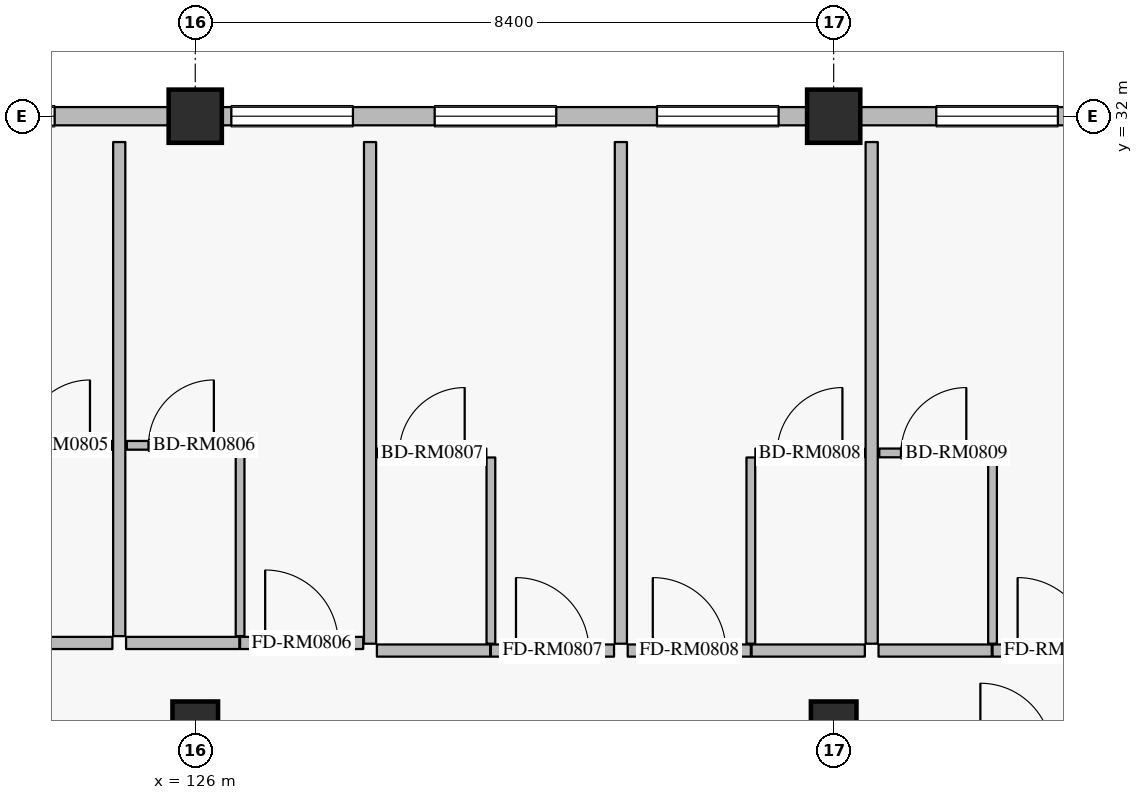
"""IFC4 building model, lengths in metres.
Left out: names, types, materials, properties, quantities, classifications, styles, units other than length and angle.
Written with IfcOpenShell. Run it as: python <this file> out.ifc"""

import sys

from ifc_helpers import new_model, si_unit, direction, frame, frame_2d, origin, origin_2d, place, context, subcontext, project, spatial, rectangle, extrude, element, fill, save


model = new_model("IFC4")
c1 = context("Model", 3, precision=1e-05, world=origin(), true_north=direction((0.0, 1.0)))
c2 = subcontext(c1, "Body", "Model", "MODEL_VIEW")
j1 = project(units=[si_unit("LENGTHUNIT", "METRE"), si_unit("PLANEANGLEUNIT", "RADIAN")], contexts=[c1])
p1 = place(None, origin())
s1 = spatial("IfcSite", under=j1, at=p1, CompositionType="ELEMENT")
p2 = place(p1, origin())
s2 = spatial("IfcBuilding", under=s1, at=p2, CompositionType="ELEMENT")
p3 = place(p2, frame((0.0, 0.0, 32.4)))
s3 = spatial("IfcBuildingStorey", under=s2, at=p3, CompositionType="ELEMENT", Elevation=32.4)
for number, where, z_axis, x_axis in (
    (1, (126.0, 32.0, 0.0), (0.0, 0.0, 1.0), (1.0, 0.0, 0.0)),
    (2, (134.4, 32.0, 0.0), (0.0, 0.0, 1.0), (1.0, 0.0, 0.0)),
):
    element("IfcColumn", number, at=place(p3, frame(where, z_axis=z_axis, x_axis=x_axis)), inside=s3, PredefinedType="COLUMN", context=c2, shape_type="SweptSolid", body=[
        extrude(rectangle(XDim=0.7, YDim=0.7, at=origin_2d()), origin(), (0.0, 0.0, 1.0), 3.6),
    ])
for number, where, z_axis, x_axis in (
    (3, (126.0, 24.0, 0.0), (0.0, 0.0, 1.0), (1.0, 0.0, 0.0)),
    (4, (134.4, 24.0, 0.0), (0.0, 0.0, 1.0), (1.0, 0.0, 0.0)),
):
    element("IfcColumn", number, at=place(p3, frame(where, z_axis=z_axis, x_axis=x_axis)), inside=s3, PredefinedType="COLUMN", context=c2, shape_type="SweptSolid", body=[
        extrude(rectangle(XDim=0.6, YDim=0.6, at=origin_2d()), origin(), (0.0, 0.0, 1.0), 3.6),
    ])
p4 = place(p3, frame((117.95, 32.0, 0.0), z_axis=(0.0, 0.0, 1.0), x_axis=(1.0, 0.0, 0.0)))
e5 = element("IfcWall", 5, at=p4, inside=s3, PredefinedType="SOLIDWALL", context=c2, shape_type="SweptSolid", body=[
    extrude(rectangle(XDim=7.7, YDim=0.24, at=frame_2d((3.85, 0.0))), origin(), (0.0, 0.0, 1.0), 2.94),
])
p5 = place(p4, frame((1.3, 0.0, 0.8)))
e6 = element("IfcOpeningElement", 6, at=p5, cuts=e5, PredefinedType="OPENING", context=c2, shape_type="SweptSolid", body=[
    extrude(rectangle(XDim=1.6, YDim=1.6, at=frame_2d((0.8, 0.8))), frame((0.0, 0.13, 0.0), z_axis=(0.0, -1.0, 0.0), x_axis=(1.0, 0.0, 0.0)), (0.0, 0.0, 1.0), 0.26),
])
p6 = place(p4, frame((4.6, 0.0, 0.8)))
e7 = element("IfcOpeningElement", 7, at=p6, cuts=e5, PredefinedType="OPENING", context=c2, shape_type="SweptSolid", body=[
    extrude(rectangle(XDim=1.6, YDim=1.6, at=frame_2d((0.8, 0.8))), frame((0.0, 0.13, 0.0), z_axis=(0.0, -1.0, 0.0), x_axis=(1.0, 0.0, 0.0)), (0.0, 0.0, 1.0), 0.26),
])
p7 = place(p3, frame((126.35, 32.0, 0.0), z_axis=(0.0, 0.0, 1.0), x_axis=(1.0, 0.0, 0.0)))
e8 = element("IfcWall", 8, at=p7, inside=s3, PredefinedType="SOLIDWALL", context=c2, shape_type="SweptSolid", body=[
    extrude(rectangle(XDim=7.7, YDim=0.24, at=frame_2d((3.85, 0.0))), origin(), (0.0, 0.0, 1.0), 2.94),
])
p8 = place(p7, frame((0.125, 0.0, 0.8)))
e9 = element("IfcOpeningElement", 9, at=p8, cuts=e8, PredefinedType="OPENING", context=c2, shape_type="SweptSolid", body=[
    extrude(rectangle(XDim=1.6, YDim=1.6, at=frame_2d((0.8, 0.8))), frame((0.0, 0.13, 0.0), z_axis=(0.0, -1.0, 0.0), x_axis=(1.0, 0.0, 0.0)), (0.0, 0.0, 1.0), 0.26),
])
p9 = place(p7, frame((2.8, 0.0, 0.8)))
e10 = element("IfcOpeningElement", 10, at=p9, cuts=e8, PredefinedType="OPENING", context=c2, shape_type="SweptSolid", body=[
    extrude(rectangle(XDim=1.6, YDim=1.6, at=frame_2d((0.8, 0.8))), frame((0.0, 0.13, 0.0), z_axis=(0.0, -1.0, 0.0), x_axis=(1.0, 0.0, 0.0)), (0.0, 0.0, 1.0), 0.26),
])
p10 = place(p7, frame((5.725, 0.0, 0.8)))
e11 = element("IfcOpeningElement", 11, at=p10, cuts=e8, PredefinedType="OPENING", context=c2, shape_type="SweptSolid", body=[
    extrude(rectangle(XDim=1.6, YDim=1.6, at=frame_2d((0.8, 0.8))), frame((0.0, 0.13, 0.0), z_axis=(0.0, -1.0, 0.0), x_axis=(1.0, 0.0, 0.0)), (0.0, 0.0, 1.0), 0.26),
])
p11 = place(p3, frame((134.75, 32.0, 0.0), z_axis=(0.0, 0.0, 1.0), x_axis=(1.0, 0.0, 0.0)))
e12 = element("IfcWall", 12, at=p11, inside=s3, PredefinedType="SOLIDWALL", context=c2, shape_type="SweptSolid", body=[
    extrude(rectangle(XDim=7.7, YDim=0.24, at=frame_2d((3.85, 0.0))), origin(), (0.0, 0.0, 1.0), 2.94),
])
p12 = place(p11, frame((1.0, 0.0, 0.8)))
e13 = element("IfcOpeningElement", 13, at=p12, cuts=e12, PredefinedType="OPENING", context=c2, shape_type="SweptSolid", body=[
    extrude(rectangle(XDim=1.6, YDim=1.6, at=frame_2d((0.8, 0.8))), frame((0.0, 0.13, 0.0), z_axis=(0.0, -1.0, 0.0), x_axis=(1.0, 0.0, 0.0)), (0.0, 0.0, 1.0), 0.26),
])
p13 = place(p11, frame((4.3, 0.0, 0.8)))
e14 = element("IfcOpeningElement", 14, at=p13, cuts=e12, PredefinedType="OPENING", context=c2, shape_type="SweptSolid", body=[
    extrude(rectangle(XDim=1.6, YDim=1.6, at=frame_2d((0.8, 0.8))), frame((0.0, 0.13, 0.0), z_axis=(0.0, -1.0, 0.0), x_axis=(1.0, 0.0, 0.0)), (0.0, 0.0, 1.0), 0.26),
])
p14 = place(p3, frame((123.42, 25.07, 0.0), z_axis=(0.0, 0.0, 1.0), x_axis=(1.0, 0.0, 0.0)))
e15 = element("IfcWall", 15, at=p14, inside=s3, PredefinedType="PARTITIONING", context=c2, shape_type="SweptSolid", body=[
    extrude(rectangle(XDim=1.49, YDim=0.16, at=frame_2d((0.745, 0.0))), origin(), (0.0, 0.0, 1.0), 3.335),
])
p15 = place(p3, frame((123.47, 27.67, 0.0), z_axis=(0.0, 0.0, 1.0), x_axis=(1.0, 0.0, 0.0)))
e16 = element("IfcWall", 16, at=p15, inside=s3, PredefinedType="PARTITIONING", context=c2, shape_type="SweptSolid", body=[
    extrude(rectangle(XDim=1.43, YDim=0.115, at=frame_2d((0.715, 0.0))), origin(), (0.0, 0.0, 1.0), 3.335),
])
p16 = place(p15, frame((0.285, 0.0, 0.0)))
e17 = element("IfcOpeningElement", 17, at=p16, cuts=e16, PredefinedType="OPENING", context=c2, shape_type="SweptSolid", body=[
    extrude(rectangle(XDim=0.86, YDim=2.12, at=frame_2d((0.43, 1.06))), frame((0.0, 0.067, 0.0), z_axis=(0.0, -1.0, 0.0), x_axis=(1.0, 0.0, 0.0)), (0.0, 0.0, 1.0), 0.135),
])
p17 = place(p3, frame((125.09, 25.07, 0.0), z_axis=(0.0, 0.0, 1.0), x_axis=(1.0, 0.0, 0.0)))
e18 = element("IfcWall", 18, at=p17, inside=s3, PredefinedType="PARTITIONING", context=c2, shape_type="SweptSolid", body=[
    extrude(rectangle(XDim=1.49, YDim=0.16, at=frame_2d((0.745, 0.0))), origin(), (0.0, 0.0, 1.0), 3.335),
])
p18 = place(p3, frame((126.59, 25.07, 0.0), z_axis=(0.0, 0.0, 1.0), x_axis=(1.0, 0.0, 0.0)))
e19 = element("IfcWall", 19, at=p18, inside=s3, PredefinedType="PARTITIONING", context=c2, shape_type="SweptSolid", body=[
    extrude(rectangle(XDim=1.62, YDim=0.16, at=frame_2d((0.81, 0.0))), origin(), (0.0, 0.0, 1.0), 3.335),
])
p19 = place(p18, frame((0.33, 0.0, 0.0)))
e20 = element("IfcOpeningElement", 20, at=p19, cuts=e19, PredefinedType="OPENING", context=c2, shape_type="SweptSolid", body=[
    extrude(rectangle(XDim=0.96, YDim=2.2, at=frame_2d((0.48, 1.1))), frame((0.0, 0.09, 0.0), z_axis=(0.0, -1.0, 0.0), x_axis=(1.0, 0.0, 0.0)), (0.0, 0.0, 1.0), 0.18),
])
p20 = place(p3, frame((126.59, 25.16, 0.0), z_axis=(0.0, 0.0, 1.0), x_axis=(0.0, 1.0, 0.0)))
e21 = element("IfcWall", 21, at=p20, inside=s3, PredefinedType="PARTITIONING", context=c2, shape_type="SweptSolid", body=[
    extrude(rectangle(XDim=2.45, YDim=0.115, at=frame_2d((1.225, 0.0))), origin(), (0.0, 0.0, 1.0), 3.335),
])
p21 = place(p3, frame((125.1, 27.67, 0.0), z_axis=(0.0, 0.0, 1.0), x_axis=(1.0, 0.0, 0.0)))
e22 = element("IfcWall", 22, at=p21, inside=s3, PredefinedType="PARTITIONING", context=c2, shape_type="SweptSolid", body=[
    extrude(rectangle(XDim=1.43, YDim=0.115, at=frame_2d((0.715, 0.0))), origin(), (0.0, 0.0, 1.0), 3.335),
])
p22 = place(p21, frame((0.285, 0.0, 0.0)))
e23 = element("IfcOpeningElement", 23, at=p22, cuts=e22, PredefinedType="OPENING", context=c2, shape_type="SweptSolid", body=[
    extrude(rectangle(XDim=0.86, YDim=2.12, at=frame_2d((0.43, 1.06))), frame((0.0, 0.067, 0.0), z_axis=(0.0, -1.0, 0.0), x_axis=(1.0, 0.0, 0.0)), (0.0, 0.0, 1.0), 0.135),
])
p23 = place(p3, frame((125.0, 25.16, 0.0), z_axis=(0.0, 0.0, 1.0), x_axis=(0.0, 1.0, 0.0)))
e24 = element("IfcWall", 24, at=p23, inside=s3, PredefinedType="PARTITIONING", context=c2, shape_type="SweptSolid", body=[
    extrude(rectangle(XDim=6.5, YDim=0.16, at=frame_2d((3.25, 0.0))), origin(), (0.0, 0.0, 1.0), 3.335),
])
p24 = place(p3, frame((128.39, 24.97, 0.0), z_axis=(0.0, 0.0, 1.0), x_axis=(1.0, 0.0, 0.0)))
e25 = element("IfcWall", 25, at=p24, inside=s3, PredefinedType="PARTITIONING", context=c2, shape_type="SweptSolid", body=[
    extrude(rectangle(XDim=1.49, YDim=0.16, at=frame_2d((0.745, 0.0))), origin(), (0.0, 0.0, 1.0), 3.335),
])
p25 = place(p3, frame((129.89, 24.97, 0.0), z_axis=(0.0, 0.0, 1.0), x_axis=(1.0, 0.0, 0.0)))
e26 = element("IfcWall", 26, at=p25, inside=s3, PredefinedType="PARTITIONING", context=c2, shape_type="SweptSolid", body=[
    extrude(rectangle(XDim=1.62, YDim=0.16, at=frame_2d((0.81, 0.0))), origin(), (0.0, 0.0, 1.0), 3.335),
])
p26 = place(p25, frame((0.33, 0.0, 0.0)))
e27 = element("IfcOpeningElement", 27, at=p26, cuts=e26, PredefinedType="OPENING", context=c2, shape_type="SweptSolid", body=[
    extrude(rectangle(XDim=0.96, YDim=2.2, at=frame_2d((0.48, 1.1))), frame((0.0, 0.09, 0.0), z_axis=(0.0, -1.0, 0.0), x_axis=(1.0, 0.0, 0.0)), (0.0, 0.0, 1.0), 0.18),
])
p27 = place(p3, frame((129.89, 25.06, 0.0), z_axis=(0.0, 0.0, 1.0), x_axis=(0.0, 1.0, 0.0)))
e28 = element("IfcWall", 28, at=p27, inside=s3, PredefinedType="PARTITIONING", context=c2, shape_type="SweptSolid", body=[
    extrude(rectangle(XDim=2.45, YDim=0.115, at=frame_2d((1.225, 0.0))), origin(), (0.0, 0.0, 1.0), 3.335),
])
p28 = place(p3, frame((128.4, 27.57, 0.0), z_axis=(0.0, 0.0, 1.0), x_axis=(1.0, 0.0, 0.0)))
e29 = element("IfcWall", 29, at=p28, inside=s3, PredefinedType="PARTITIONING", context=c2, shape_type="SweptSolid", body=[
    extrude(rectangle(XDim=1.43, YDim=0.115, at=frame_2d((0.715, 0.0))), origin(), (0.0, 0.0, 1.0), 3.335),
])
p29 = place(p28, frame((0.285, 0.0, 0.0)))
e30 = element("IfcOpeningElement", 30, at=p29, cuts=e29, PredefinedType="OPENING", context=c2, shape_type="SweptSolid", body=[
    extrude(rectangle(XDim=0.86, YDim=2.12, at=frame_2d((0.43, 1.06))), frame((0.0, 0.067, 0.0), z_axis=(0.0, -1.0, 0.0), x_axis=(1.0, 0.0, 0.0)), (0.0, 0.0, 1.0), 0.135),
])
p30 = place(p3, frame((128.3, 25.06, 0.0), z_axis=(0.0, 0.0, 1.0), x_axis=(0.0, 1.0, 0.0)))
e31 = element("IfcWall", 31, at=p30, inside=s3, PredefinedType="PARTITIONING", context=c2, shape_type="SweptSolid", body=[
    extrude(rectangle(XDim=6.6, YDim=0.16, at=frame_2d((3.3, 0.0))), origin(), (0.0, 0.0, 1.0), 3.335),
])
p31 = place(p3, frame((131.69, 24.97, 0.0), z_axis=(0.0, 0.0, 1.0), x_axis=(1.0, 0.0, 0.0)))
e32 = element("IfcWall", 32, at=p31, inside=s3, PredefinedType="PARTITIONING", context=c2, shape_type="SweptSolid", body=[
    extrude(rectangle(XDim=1.62, YDim=0.16, at=frame_2d((0.81, 0.0))), origin(), (0.0, 0.0, 1.0), 3.335),
])
p32 = place(p31, frame((0.33, 0.0, 0.0)))
e33 = element("IfcOpeningElement", 33, at=p32, cuts=e32, PredefinedType="OPENING", context=c2, shape_type="SweptSolid", body=[
    extrude(rectangle(XDim=0.96, YDim=2.2, at=frame_2d((0.48, 1.1))), frame((0.0, 0.09, 0.0), z_axis=(0.0, -1.0, 0.0), x_axis=(1.0, 0.0, 0.0)), (0.0, 0.0, 1.0), 0.18),
])
p33 = place(p3, frame((133.32, 24.97, 0.0), z_axis=(0.0, 0.0, 1.0), x_axis=(1.0, 0.0, 0.0)))
e34 = element("IfcWall", 34, at=p33, inside=s3, PredefinedType="PARTITIONING", context=c2, shape_type="SweptSolid", body=[
    extrude(rectangle(XDim=1.49, YDim=0.16, at=frame_2d((0.745, 0.0))), origin(), (0.0, 0.0, 1.0), 3.335),
])
p34 = place(p3, frame((133.31, 25.06, 0.0), z_axis=(0.0, 0.0, 1.0), x_axis=(0.0, 1.0, 0.0)))
e35 = element("IfcWall", 35, at=p34, inside=s3, PredefinedType="PARTITIONING", context=c2, shape_type="SweptSolid", body=[
    extrude(rectangle(XDim=2.45, YDim=0.115, at=frame_2d((1.225, 0.0))), origin(), (0.0, 0.0, 1.0), 3.335),
])
p35 = place(p3, frame((133.37, 27.57, 0.0), z_axis=(0.0, 0.0, 1.0), x_axis=(1.0, 0.0, 0.0)))
e36 = element("IfcWall", 36, at=p35, inside=s3, PredefinedType="PARTITIONING", context=c2, shape_type="SweptSolid", body=[
    extrude(rectangle(XDim=1.43, YDim=0.115, at=frame_2d((0.715, 0.0))), origin(), (0.0, 0.0, 1.0), 3.335),
])
p36 = place(p35, frame((0.285, 0.0, 0.0)))
e37 = element("IfcOpeningElement", 37, at=p36, cuts=e36, PredefinedType="OPENING", context=c2, shape_type="SweptSolid", body=[
    extrude(rectangle(XDim=0.86, YDim=2.12, at=frame_2d((0.43, 1.06))), frame((0.0, 0.067, 0.0), z_axis=(0.0, -1.0, 0.0), x_axis=(1.0, 0.0, 0.0)), (0.0, 0.0, 1.0), 0.135),
])
p37 = place(p3, frame((131.6, 25.06, 0.0), z_axis=(0.0, 0.0, 1.0), x_axis=(0.0, 1.0, 0.0)))
e38 = element("IfcWall", 38, at=p37, inside=s3, PredefinedType="PARTITIONING", context=c2, shape_type="SweptSolid", body=[
    extrude(rectangle(XDim=6.6, YDim=0.16, at=frame_2d((3.3, 0.0))), origin(), (0.0, 0.0, 1.0), 3.335),
])
p38 = place(p3, frame((134.99, 24.97, 0.0), z_axis=(0.0, 0.0, 1.0), x_axis=(1.0, 0.0, 0.0)))
e39 = element("IfcWall", 39, at=p38, inside=s3, PredefinedType="PARTITIONING", context=c2, shape_type="SweptSolid", body=[
    extrude(rectangle(XDim=1.49, YDim=0.16, at=frame_2d((0.745, 0.0))), origin(), (0.0, 0.0, 1.0), 3.335),
])
p39 = place(p3, frame((136.49, 24.97, 0.0), z_axis=(0.0, 0.0, 1.0), x_axis=(1.0, 0.0, 0.0)))
e40 = element("IfcWall", 40, at=p39, inside=s3, PredefinedType="PARTITIONING", context=c2, shape_type="SweptSolid", body=[
    extrude(rectangle(XDim=1.62, YDim=0.16, at=frame_2d((0.81, 0.0))), origin(), (0.0, 0.0, 1.0), 3.335),
])
p40 = place(p39, frame((0.33, 0.0, 0.0)))
e41 = element("IfcOpeningElement", 41, at=p40, cuts=e40, PredefinedType="OPENING", context=c2, shape_type="SweptSolid", body=[
    extrude(rectangle(XDim=0.96, YDim=2.2, at=frame_2d((0.48, 1.1))), frame((0.0, 0.09, 0.0), z_axis=(0.0, -1.0, 0.0), x_axis=(1.0, 0.0, 0.0)), (0.0, 0.0, 1.0), 0.18),
])
p41 = place(p3, frame((136.49, 25.06, 0.0), z_axis=(0.0, 0.0, 1.0), x_axis=(0.0, 1.0, 0.0)))
e42 = element("IfcWall", 42, at=p41, inside=s3, PredefinedType="PARTITIONING", context=c2, shape_type="SweptSolid", body=[
    extrude(rectangle(XDim=2.45, YDim=0.115, at=frame_2d((1.225, 0.0))), origin(), (0.0, 0.0, 1.0), 3.335),
])
p42 = place(p3, frame((135.0, 27.57, 0.0), z_axis=(0.0, 0.0, 1.0), x_axis=(1.0, 0.0, 0.0)))
e43 = element("IfcWall", 43, at=p42, inside=s3, PredefinedType="PARTITIONING", context=c2, shape_type="SweptSolid", body=[
    extrude(rectangle(XDim=1.43, YDim=0.115, at=frame_2d((0.715, 0.0))), origin(), (0.0, 0.0, 1.0), 3.335),
])
p43 = place(p42, frame((0.285, 0.0, 0.0)))
e44 = element("IfcOpeningElement", 44, at=p43, cuts=e43, PredefinedType="OPENING", context=c2, shape_type="SweptSolid", body=[
    extrude(rectangle(XDim=0.86, YDim=2.12, at=frame_2d((0.43, 1.06))), frame((0.0, 0.067, 0.0), z_axis=(0.0, -1.0, 0.0), x_axis=(1.0, 0.0, 0.0)), (0.0, 0.0, 1.0), 0.135),
])
p44 = place(p3, frame((134.9, 25.06, 0.0), z_axis=(0.0, 0.0, 1.0), x_axis=(0.0, 1.0, 0.0)))
e45 = element("IfcWall", 45, at=p44, inside=s3, PredefinedType="PARTITIONING", context=c2, shape_type="SweptSolid", body=[
    extrude(rectangle(XDim=6.6, YDim=0.16, at=frame_2d((3.3, 0.0))), origin(), (0.0, 0.0, 1.0), 3.335),
])
p45 = place(p6, origin())
e46 = element("IfcWindow", 46, at=p45, inside=s3, PartitioningType="SINGLE_PANEL", PredefinedType="WINDOW", context=c2, shape_type="SweptSolid", body=[
    extrude(rectangle(XDim=1.6, YDim=1.6, at=frame_2d((0.8, 0.8))), frame((0.0, 0.03, 0.0), z_axis=(0.0, -1.0, 0.0), x_axis=(1.0, 0.0, 0.0)), (0.0, 0.0, 1.0), 0.06),
])
fill(e7, e46)
p46 = place(p8, origin())
e47 = element("IfcWindow", 47, at=p46, inside=s3, PartitioningType="SINGLE_PANEL", PredefinedType="WINDOW", context=c2, shape_type="SweptSolid", body=[
    extrude(rectangle(XDim=1.6, YDim=1.6, at=frame_2d((0.8, 0.8))), frame((0.0, 0.03, 0.0), z_axis=(0.0, -1.0, 0.0), x_axis=(1.0, 0.0, 0.0)), (0.0, 0.0, 1.0), 0.06),
])
fill(e9, e47)
p47 = place(p9, origin())
e48 = element("IfcWindow", 48, at=p47, inside=s3, PartitioningType="SINGLE_PANEL", PredefinedType="WINDOW", context=c2, shape_type="SweptSolid", body=[
    extrude(rectangle(XDim=1.6, YDim=1.6, at=frame_2d((0.8, 0.8))), frame((0.0, 0.03, 0.0), z_axis=(0.0, -1.0, 0.0), x_axis=(1.0, 0.0, 0.0)), (0.0, 0.0, 1.0), 0.06),
])
fill(e10, e48)
p48 = place(p10, origin())
e49 = element("IfcWindow", 49, at=p48, inside=s3, PartitioningType="SINGLE_PANEL", PredefinedType="WINDOW", context=c2, shape_type="SweptSolid", body=[
    extrude(rectangle(XDim=1.6, YDim=1.6, at=frame_2d((0.8, 0.8))), frame((0.0, 0.03, 0.0), z_axis=(0.0, -1.0, 0.0), x_axis=(1.0, 0.0, 0.0)), (0.0, 0.0, 1.0), 0.06),
])
fill(e11, e49)
p49 = place(p12, origin())
e50 = element("IfcWindow", 50, at=p49, inside=s3, PartitioningType="SINGLE_PANEL", PredefinedType="WINDOW", context=c2, shape_type="SweptSolid", body=[
    extrude(rectangle(XDim=1.6, YDim=1.6, at=frame_2d((0.8, 0.8))), frame((0.0, 0.03, 0.0), z_axis=(0.0, -1.0, 0.0), x_axis=(1.0, 0.0, 0.0)), (0.0, 0.0, 1.0), 0.06),
])
fill(e13, e50)
p50 = place(p16, origin())
e51 = element("IfcDoor", 51, at=p50, inside=s3, OperationType="SINGLE_SWING_RIGHT", PredefinedType="DOOR", context=c2, shape_type="SweptSolid", body=[
    extrude(rectangle(XDim=0.86, YDim=2.12, at=frame_2d((0.43, 1.06))), frame((0.0, 0.025, 0.0), z_axis=(0.0, -1.0, 0.0), x_axis=(1.0, 0.0, 0.0)), (0.0, 0.0, 1.0), 0.05),
])
fill(e17, e51)
p51 = place(p19, origin())
e52 = element("IfcDoor", 52, at=p51, inside=s3, OperationType="SINGLE_SWING_LEFT", PredefinedType="DOOR", context=c2, shape_type="SweptSolid", body=[
    extrude(rectangle(XDim=0.96, YDim=2.2, at=frame_2d((0.48, 1.1))), frame((0.0, 0.025, 0.0), z_axis=(0.0, -1.0, 0.0), x_axis=(1.0, 0.0, 0.0)), (0.0, 0.0, 1.0), 0.05),
])
fill(e20, e52)
p52 = place(p22, origin())
e53 = element("IfcDoor", 53, at=p52, inside=s3, OperationType="SINGLE_SWING_RIGHT", PredefinedType="DOOR", context=c2, shape_type="SweptSolid", body=[
    extrude(rectangle(XDim=0.86, YDim=2.12, at=frame_2d((0.43, 1.06))), frame((0.0, 0.025, 0.0), z_axis=(0.0, -1.0, 0.0), x_axis=(1.0, 0.0, 0.0)), (0.0, 0.0, 1.0), 0.05),
])
fill(e23, e53)
p53 = place(p26, origin())
e54 = element("IfcDoor", 54, at=p53, inside=s3, OperationType="SINGLE_SWING_LEFT", PredefinedType="DOOR", context=c2, shape_type="SweptSolid", body=[
    extrude(rectangle(XDim=0.96, YDim=2.2, at=frame_2d((0.48, 1.1))), frame((0.0, 0.025, 0.0), z_axis=(0.0, -1.0, 0.0), x_axis=(1.0, 0.0, 0.0)), (0.0, 0.0, 1.0), 0.05),
])
fill(e27, e54)
p54 = place(p29, origin())
e55 = element("IfcDoor", 55, at=p54, inside=s3, OperationType="SINGLE_SWING_RIGHT", PredefinedType="DOOR", context=c2, shape_type="SweptSolid", body=[
    extrude(rectangle(XDim=0.86, YDim=2.12, at=frame_2d((0.43, 1.06))), frame((0.0, 0.025, 0.0), z_axis=(0.0, -1.0, 0.0), x_axis=(1.0, 0.0, 0.0)), (0.0, 0.0, 1.0), 0.05),
])
fill(e30, e55)
p55 = place(p32, origin())
e56 = element("IfcDoor", 56, at=p55, inside=s3, OperationType="SINGLE_SWING_LEFT", PredefinedType="DOOR", context=c2, shape_type="SweptSolid", body=[
    extrude(rectangle(XDim=0.96, YDim=2.2, at=frame_2d((0.48, 1.1))), frame((0.0, 0.025, 0.0), z_axis=(0.0, -1.0, 0.0), x_axis=(1.0, 0.0, 0.0)), (0.0, 0.0, 1.0), 0.05),
])
fill(e33, e56)
p56 = place(p36, origin())
e57 = element("IfcDoor", 57, at=p56, inside=s3, OperationType="SINGLE_SWING_RIGHT", PredefinedType="DOOR", context=c2, shape_type="SweptSolid", body=[
    extrude(rectangle(XDim=0.86, YDim=2.12, at=frame_2d((0.43, 1.06))), frame((0.0, 0.025, 0.0), z_axis=(0.0, -1.0, 0.0), x_axis=(1.0, 0.0, 0.0)), (0.0, 0.0, 1.0), 0.05),
])
fill(e37, e57)
p57 = place(p40, origin())
e58 = element("IfcDoor", 58, at=p57, inside=s3, OperationType="SINGLE_SWING_LEFT", PredefinedType="DOOR", context=c2, shape_type="SweptSolid", body=[
    extrude(rectangle(XDim=0.96, YDim=2.2, at=frame_2d((0.48, 1.1))), frame((0.0, 0.025, 0.0), z_axis=(0.0, -1.0, 0.0), x_axis=(1.0, 0.0, 0.0)), (0.0, 0.0, 1.0), 0.05),
])
fill(e41, e58)
p58 = place(p43, origin())
e59 = element("IfcDoor", 59, at=p58, inside=s3, OperationType="SINGLE_SWING_RIGHT", PredefinedType="DOOR", context=c2, shape_type="SweptSolid", body=[
    extrude(rectangle(XDim=0.86, YDim=2.12, at=frame_2d((0.43, 1.06))), frame((0.0, 0.025, 0.0), z_axis=(0.0, -1.0, 0.0), x_axis=(1.0, 0.0, 0.0)), (0.0, 0.0, 1.0), 0.05),
])
fill(e44, e59)
save(model, sys.argv[1])
